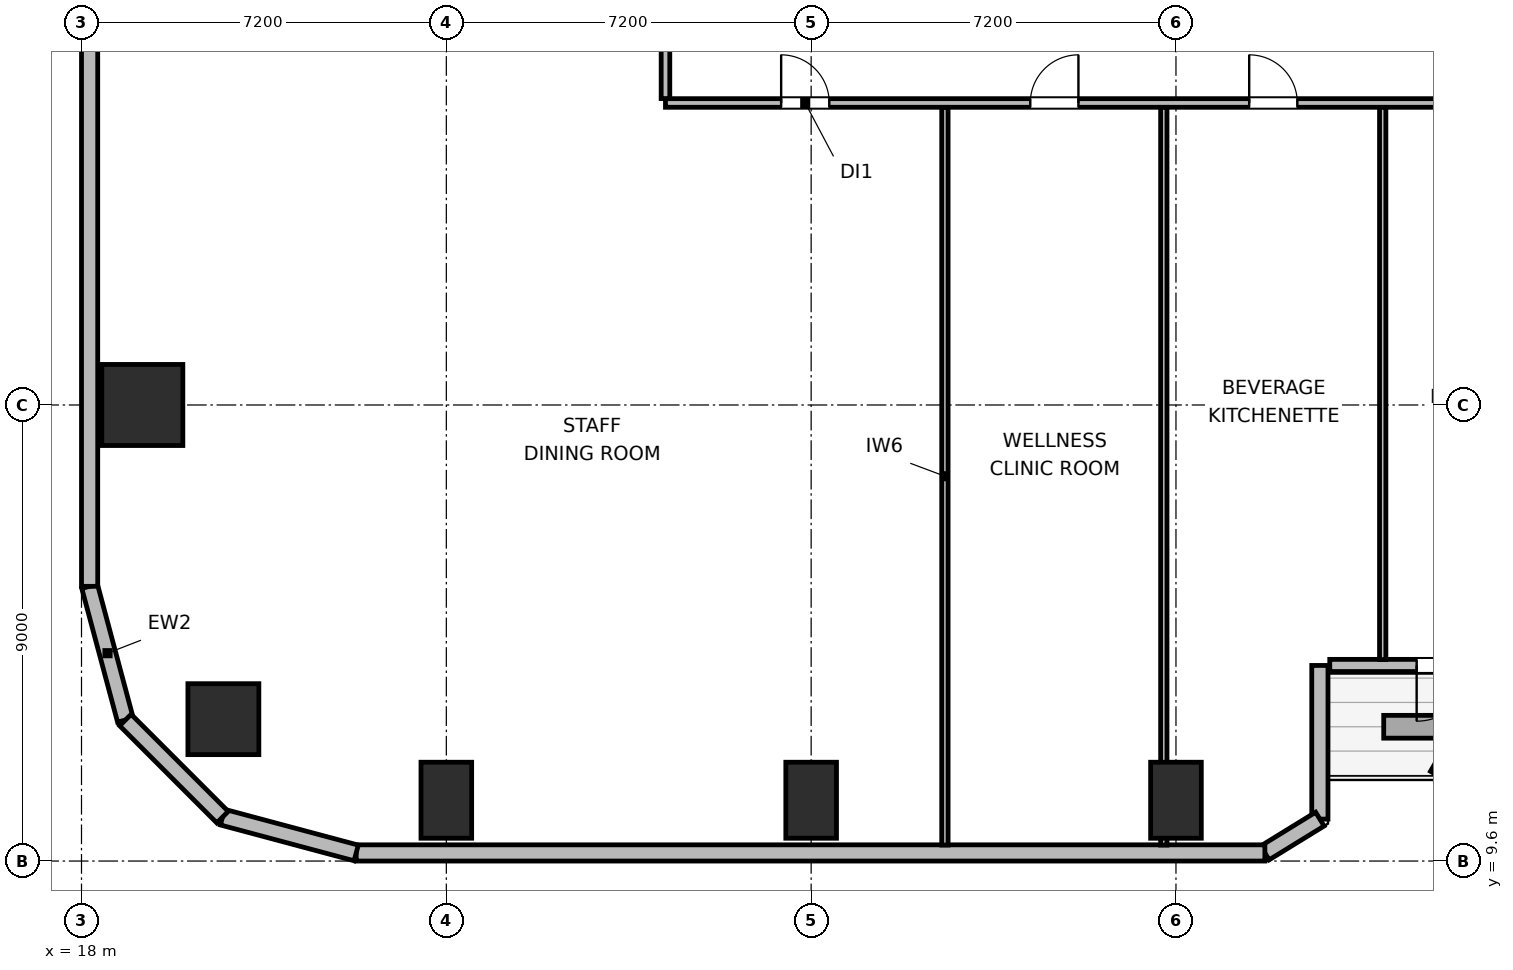
"""IFC4 building model, lengths in metres.
Left out: names, types, materials, properties, quantities, classifications, styles, units other than length and angle.
Written with IfcOpenShell. Run it as: python <this file> out.ifc"""

import sys

from ifc_helpers import new_model, si_unit, direction, frame, frame_2d, origin, origin_2d, place, context, subcontext, project, spatial, rectangle, circle, extrude, element, fill, save


model = new_model("IFC4")
c1 = context("Model", 3, precision=1e-05, world=origin(), true_north=direction((0.0, 1.0)))
c2 = subcontext(c1, "Body", "Model", "MODEL_VIEW")
j1 = project(units=[si_unit("LENGTHUNIT", "METRE"), si_unit("PLANEANGLEUNIT", "RADIAN")], contexts=[c1])
p1 = place(None, origin())
s1 = spatial("IfcSite", under=j1, at=p1, CompositionType="ELEMENT")
p2 = place(p1, origin())
s2 = spatial("IfcBuilding", under=s1, at=p2, CompositionType="ELEMENT")
p3 = place(p2, frame((0.0, 0.0, 60.6)))
s3 = spatial("IfcBuildingStorey", under=s2, at=p3, CompositionType="ELEMENT", Elevation=60.6)
p4 = place(p3, frame((20.8, 12.4, 0.0), z_axis=(0.0, 0.0, 1.0), x_axis=(1.0, 0.0, 0.0)))
e1 = element("IfcColumn", 1, at=p4, inside=s3, PredefinedType="COLUMN", context=c2, shape_type="SweptSolid", body=[
    extrude(circle(Radius=0.7, at=origin_2d()), origin(), (0.0, 0.0, 1.0), 3.9),
])
for number, where, z_axis, x_axis in (
    (2, (25.2, 10.8, 0.0), (0.0, 0.0, 1.0), (1.0, 0.0, 0.0)),
    (3, (32.4, 10.8, 0.0), (0.0, 0.0, 1.0), (1.0, 0.0, 0.0)),
    (4, (39.6, 10.8, 0.0), (0.0, 0.0, 1.0), (1.0, 0.0, 0.0)),
):
    element("IfcColumn", number, at=place(p3, frame(where, z_axis=z_axis, x_axis=x_axis)), inside=s3, PredefinedType="COLUMN", context=c2, shape_type="SweptSolid", body=[
        extrude(rectangle(XDim=1.0, YDim=1.5, at=origin_2d()), origin(), (0.0, 0.0, 1.0), 3.9),
    ])
p5 = place(p3, frame((19.2, 18.6, 0.0), z_axis=(0.0, 0.0, 1.0), x_axis=(1.0, 0.0, 0.0)))
e5 = element("IfcColumn", 5, at=p5, inside=s3, PredefinedType="COLUMN", context=c2, shape_type="SweptSolid", body=[
    extrude(rectangle(XDim=1.6, YDim=1.6, at=origin_2d()), origin(), (0.0, 0.0, 1.0), 3.9),
])
p6 = place(p3, frame((18.866, 12.383, 0.0), z_axis=(0.0, 0.0, 1.0), x_axis=(-0.25869736047, 0.965958423373, 0.0)))
e6 = element("IfcWall", 6, at=p6, inside=s3, PredefinedType="SOLIDWALL", context=c2, shape_type="SweptSolid", body=[
    extrude(rectangle(XDim=2.731, YDim=0.32, at=frame_2d((1.366, 0.0))), origin(), (0.0, 0.0, 1.0), 3.64),
])
p7 = place(p3, frame((18.16, 15.021, 0.0), z_axis=(0.0, 0.0, 1.0), x_axis=(0.0, 1.0, 0.0)))
e7 = element("IfcWall", 7, at=p7, inside=s3, PredefinedType="SOLIDWALL", context=c2, shape_type="SweptSolid", body=[
    extrude(rectangle(XDim=14.219, YDim=0.32, at=frame_2d((7.109, 0.0))), origin(), (0.0, 0.0, 1.0), 3.64),
])
p8 = place(p3, frame((47.165, 13.46, 0.0), z_axis=(0.0, 0.0, 1.0), x_axis=(-1.0, 0.0, 0.0)))
e8 = element("IfcWall", 8, at=p8, inside=s3, PredefinedType="SOLIDWALL", context=c2, shape_type="SweptSolid", body=[
    extrude(rectangle(XDim=4.53, YDim=0.24, at=frame_2d((2.265, 0.0))), origin(), (0.0, 0.0, 1.0), 3.64),
])
p9 = place(p8, frame((1.715, 0.0, 0.0)))
e9 = element("IfcOpeningElement", 9, at=p9, cuts=e8, PredefinedType="OPENING", context=c2, shape_type="SweptSolid", body=[
    extrude(rectangle(XDim=1.1, YDim=2.04, at=frame_2d((0.55, 1.02))), frame((0.0, 0.13, 0.0), z_axis=(0.0, -1.0, 0.0), x_axis=(1.0, 0.0, 0.0)), (0.0, 0.0, 1.0), 0.26),
])
p10 = place(p3, frame((42.44, 13.46, 0.0), z_axis=(0.0, 0.0, 1.0), x_axis=(0.0, -1.0, 0.0)))
e10 = element("IfcWall", 10, at=p10, inside=s3, PredefinedType="SOLIDWALL", context=c2, shape_type="SweptSolid", body=[
    extrude(rectangle(XDim=3.032, YDim=0.32, at=frame_2d((1.516, 0.0))), origin(), (0.0, 0.0, 1.0), 2.875),
])
p11 = place(p3, frame((42.44, 10.427, 0.0), z_axis=(0.0, 0.0, 1.0), x_axis=(-0.851776724646, -0.523904964045, 0.0)))
e11 = element("IfcWall", 11, at=p11, inside=s3, PredefinedType="SOLIDWALL", context=c2, shape_type="SweptSolid", body=[
    extrude(rectangle(XDim=1.274, YDim=0.32, at=frame_2d((0.637, 0.0))), origin(), (0.0, 0.0, 1.0), 3.64),
])
p12 = place(p3, frame((41.355, 9.76, 0.0), z_axis=(0.0, 0.0, 1.0), x_axis=(-1.0, 0.0, 0.0)))
e12 = element("IfcWall", 12, at=p12, inside=s3, PredefinedType="SOLIDWALL", context=c2, shape_type="SweptSolid", body=[
    extrude(rectangle(XDim=17.934, YDim=0.32, at=frame_2d((8.967, 0.0))), origin(), (0.0, 0.0, 1.0), 3.64),
])
p13 = place(p3, frame((23.421, 9.76, 0.0), z_axis=(0.0, 0.0, 1.0), x_axis=(-0.965964405026, 0.25867502435, 0.0)))
e13 = element("IfcWall", 13, at=p13, inside=s3, PredefinedType="SOLIDWALL", context=c2, shape_type="SweptSolid", body=[
    extrude(rectangle(XDim=2.731, YDim=0.32, at=frame_2d((1.366, 0.0))), origin(), (0.0, 0.0, 1.0), 3.64),
])
p14 = place(p3, frame((20.783, 10.467, 0.0), z_axis=(0.0, 0.0, 1.0), x_axis=(-0.707106781187, 0.707106781187, 0.0)))
e14 = element("IfcWall", 14, at=p14, inside=s3, PredefinedType="SOLIDWALL", context=c2, shape_type="SweptSolid", body=[
    extrude(rectangle(XDim=2.71, YDim=0.32, at=frame_2d((1.355, 0.0))), origin(), (0.0, 0.0, 1.0), 3.64),
])
p15 = place(p3, frame((29.525, 24.56, 0.0), z_axis=(0.0, 0.0, 1.0), x_axis=(1.0, 0.0, 0.0)))
e15 = element("IfcWall", 15, at=p15, inside=s3, PredefinedType="PARTITIONING", context=c2, shape_type="SweptSolid", body=[
    extrude(rectangle(XDim=36.95, YDim=0.17, at=frame_2d((18.475, 0.0))), origin(), (0.0, 0.0, 1.0), 3.64),
])
p16 = place(p15, frame((2.283, 0.0, 0.0)))
e16 = element("IfcOpeningElement", 16, at=p16, cuts=e15, PredefinedType="OPENING", context=c2, shape_type="SweptSolid", body=[
    extrude(rectangle(XDim=0.95, YDim=2.04, at=frame_2d((0.475, 1.02))), frame((0.0, 0.095, 0.0), z_axis=(0.0, -1.0, 0.0), x_axis=(1.0, 0.0, 0.0)), (0.0, 0.0, 1.0), 0.19),
])
p17 = place(p15, frame((7.2, 0.0, 0.0)))
e17 = element("IfcOpeningElement", 17, at=p17, cuts=e15, PredefinedType="OPENING", context=c2, shape_type="SweptSolid", body=[
    extrude(rectangle(XDim=0.95, YDim=2.04, at=frame_2d((0.475, 1.02))), frame((0.0, 0.095, 0.0), z_axis=(0.0, -1.0, 0.0), x_axis=(1.0, 0.0, 0.0)), (0.0, 0.0, 1.0), 0.19),
])
p18 = place(p15, frame((11.52, 0.0, 0.0)))
e18 = element("IfcOpeningElement", 18, at=p18, cuts=e15, PredefinedType="OPENING", context=c2, shape_type="SweptSolid", body=[
    extrude(rectangle(XDim=0.95, YDim=2.04, at=frame_2d((0.475, 1.02))), frame((0.0, 0.095, 0.0), z_axis=(0.0, -1.0, 0.0), x_axis=(1.0, 0.0, 0.0)), (0.0, 0.0, 1.0), 0.19),
])
p19 = place(p15, frame((15.84, 0.0, 0.0)))
e19 = element("IfcOpeningElement", 19, at=p19, cuts=e15, PredefinedType="OPENING", context=c2, shape_type="SweptSolid", body=[
    extrude(rectangle(XDim=0.95, YDim=2.04, at=frame_2d((0.475, 1.02))), frame((0.0, 0.095, 0.0), z_axis=(0.0, -1.0, 0.0), x_axis=(1.0, 0.0, 0.0)), (0.0, 0.0, 1.0), 0.19),
])
p20 = place(p15, frame((20.16, 0.0, 0.0)))
e20 = element("IfcOpeningElement", 20, at=p20, cuts=e15, PredefinedType="OPENING", context=c2, shape_type="SweptSolid", body=[
    extrude(rectangle(XDim=0.95, YDim=2.04, at=frame_2d((0.475, 1.02))), frame((0.0, 0.095, 0.0), z_axis=(0.0, -1.0, 0.0), x_axis=(1.0, 0.0, 0.0)), (0.0, 0.0, 1.0), 0.19),
])
p21 = place(p15, frame((24.48, 0.0, 0.0)))
e21 = element("IfcOpeningElement", 21, at=p21, cuts=e15, PredefinedType="OPENING", context=c2, shape_type="SweptSolid", body=[
    extrude(rectangle(XDim=0.95, YDim=2.04, at=frame_2d((0.475, 1.02))), frame((0.0, 0.095, 0.0), z_axis=(0.0, -1.0, 0.0), x_axis=(1.0, 0.0, 0.0)), (0.0, 0.0, 1.0), 0.19),
])
p22 = place(p15, frame((28.8, 0.0, 0.0)))
e22 = element("IfcOpeningElement", 22, at=p22, cuts=e15, PredefinedType="OPENING", context=c2, shape_type="SweptSolid", body=[
    extrude(rectangle(XDim=0.95, YDim=2.04, at=frame_2d((0.475, 1.02))), frame((0.0, 0.095, 0.0), z_axis=(0.0, -1.0, 0.0), x_axis=(1.0, 0.0, 0.0)), (0.0, 0.0, 1.0), 0.19),
])
p23 = place(p15, frame((33.718, 0.0, 0.0)))
e23 = element("IfcOpeningElement", 23, at=p23, cuts=e15, PredefinedType="OPENING", context=c2, shape_type="SweptSolid", body=[
    extrude(rectangle(XDim=0.95, YDim=2.04, at=frame_2d((0.475, 1.02))), frame((0.0, 0.095, 0.0), z_axis=(0.0, -1.0, 0.0), x_axis=(1.0, 0.0, 0.0)), (0.0, 0.0, 1.0), 0.19),
])
p24 = place(p3, frame((29.525, 24.647, 0.0), z_axis=(0.0, 0.0, 1.0), x_axis=(0.0, 1.0, 0.0)))
e24 = element("IfcWall", 24, at=p24, inside=s3, PredefinedType="PARTITIONING", context=c2, shape_type="SweptSolid", body=[
    extrude(rectangle(XDim=22.706, YDim=0.17, at=frame_2d((11.353, 0.0))), origin(), (0.0, 0.0, 1.0), 3.64),
])
p25 = place(p24, frame((4.758, 0.0, 0.0)))
e25 = element("IfcOpeningElement", 25, at=p25, cuts=e24, PredefinedType="OPENING", context=c2, shape_type="SweptSolid", body=[
    extrude(rectangle(XDim=0.95, YDim=2.04, at=frame_2d((0.475, 1.02))), frame((0.0, 0.095, 0.0), z_axis=(0.0, -1.0, 0.0), x_axis=(1.0, 0.0, 0.0)), (0.0, 0.0, 1.0), 0.19),
])
p26 = place(p24, frame((16.198, 0.0, 0.0)))
e26 = element("IfcOpeningElement", 26, at=p26, cuts=e24, PredefinedType="OPENING", context=c2, shape_type="SweptSolid", body=[
    extrude(rectangle(XDim=0.95, YDim=2.04, at=frame_2d((0.475, 1.02))), frame((0.0, 0.095, 0.0), z_axis=(0.0, -1.0, 0.0), x_axis=(1.0, 0.0, 0.0)), (0.0, 0.0, 1.0), 0.19),
])
p27 = place(p3, frame((35.04, 9.915, 0.0), z_axis=(0.0, 0.0, 1.0), x_axis=(0.0, 1.0, 0.0)))
e27 = element("IfcWall", 27, at=p27, inside=s3, PredefinedType="PARTITIONING", context=c2, shape_type="SweptSolid", body=[
    extrude(rectangle(XDim=14.558, YDim=0.125, at=frame_2d((7.279, 0.0))), origin(), (0.0, 0.0, 1.0), 3.64),
])
p28 = place(p3, frame((39.36, 9.915, 0.0), z_axis=(0.0, 0.0, 1.0), x_axis=(0.0, 1.0, 0.0)))
e28 = element("IfcWall", 28, at=p28, inside=s3, PredefinedType="PARTITIONING", context=c2, shape_type="SweptSolid", body=[
    extrude(rectangle(XDim=14.558, YDim=0.125, at=frame_2d((7.279, 0.0))), origin(), (0.0, 0.0, 1.0), 2.93),
])
p29 = place(p3, frame((43.68, 13.575, 0.0), z_axis=(0.0, 0.0, 1.0), x_axis=(0.0, 1.0, 0.0)))
e29 = element("IfcWall", 29, at=p29, inside=s3, PredefinedType="PARTITIONING", context=c2, shape_type="SweptSolid", body=[
    extrude(rectangle(XDim=10.898, YDim=0.125, at=frame_2d((5.449, 0.0))), origin(), (0.0, 0.0, 1.0), 3.003),
])
p30 = place(p9, origin())
e30 = element("IfcDoor", 30, at=p30, inside=s3, OperationType="SINGLE_SWING_RIGHT", PredefinedType="DOOR", context=c2, shape_type="SweptSolid", body=[
    extrude(rectangle(XDim=1.1, YDim=2.04, at=frame_2d((0.55, 1.02))), frame((0.0, 0.025, 0.0), z_axis=(0.0, -1.0, 0.0), x_axis=(1.0, 0.0, 0.0)), (0.0, 0.0, 1.0), 0.05),
])
fill(e9, e30)
p31 = place(p16, origin())
e31 = element("IfcDoor", 31, at=p31, inside=s3, OperationType="SINGLE_SWING_LEFT", PredefinedType="DOOR", context=c2, shape_type="SweptSolid", body=[
    extrude(rectangle(XDim=0.95, YDim=2.04, at=frame_2d((0.475, 1.02))), frame((0.0, 0.025, 0.0), z_axis=(0.0, -1.0, 0.0), x_axis=(1.0, 0.0, 0.0)), (0.0, 0.0, 1.0), 0.05),
])
fill(e16, e31)
p32 = place(p17, origin())
e32 = element("IfcDoor", 32, at=p32, inside=s3, OperationType="SINGLE_SWING_RIGHT", PredefinedType="DOOR", context=c2, shape_type="SweptSolid", body=[
    extrude(rectangle(XDim=0.95, YDim=2.04, at=frame_2d((0.475, 1.02))), frame((0.0, 0.025, 0.0), z_axis=(0.0, -1.0, 0.0), x_axis=(1.0, 0.0, 0.0)), (0.0, 0.0, 1.0), 0.05),
])
fill(e17, e32)
p33 = place(p18, origin())
e33 = element("IfcDoor", 33, at=p33, inside=s3, OperationType="SINGLE_SWING_LEFT", PredefinedType="DOOR", context=c2, shape_type="SweptSolid", body=[
    extrude(rectangle(XDim=0.95, YDim=2.04, at=frame_2d((0.475, 1.02))), frame((0.0, 0.025, 0.0), z_axis=(0.0, -1.0, 0.0), x_axis=(1.0, 0.0, 0.0)), (0.0, 0.0, 1.0), 0.05),
])
fill(e18, e33)
save(model, sys.argv[1])
